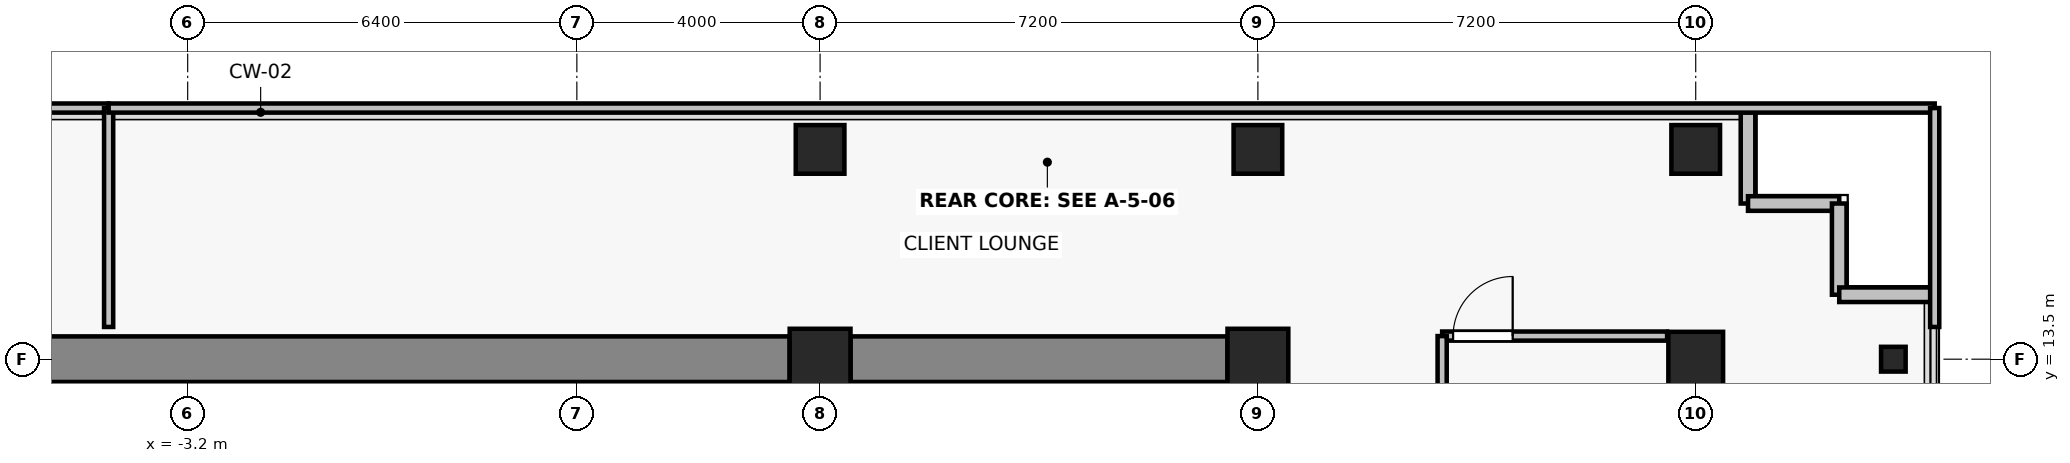
"""IFC4 building model, lengths in metres.
Left out: names, types, materials, properties, quantities, classifications, styles, units other than length and angle.
Written with IfcOpenShell. Run it as: python <this file> out.ifc"""

import sys

from ifc_helpers import new_model, si_unit, direction, frame, frame_2d, origin, origin_2d, place, context, subcontext, project, spatial, rectangle, i_section, extrude, source, transform, mapped, element, fill, save


model = new_model("IFC4")
c1 = context("Model", 3, precision=1e-05, world=origin(), true_north=direction((0.0, 1.0)))
c2 = subcontext(c1, "Body", "Model", "MODEL_VIEW")
j1 = project(units=[si_unit("LENGTHUNIT", "METRE"), si_unit("PLANEANGLEUNIT", "RADIAN")], contexts=[c1])
p1 = place(None, origin())
s1 = spatial("IfcSite", under=j1, at=p1, CompositionType="ELEMENT")
p2 = place(p1, origin())
s2 = spatial("IfcBuilding", under=s1, at=p2, CompositionType="ELEMENT")
p3 = place(p2, frame((0.0, 0.0, 109.9)))
s3 = spatial("IfcBuildingStorey", under=s2, at=p3, CompositionType="ELEMENT", Elevation=109.9)
for number, where, z_axis, x_axis in (
    (1, (7.2, 13.5, 0.0), (0.0, 0.0, 1.0), (1.0, 0.0, 0.0)),
    (2, (14.4, 13.5, 0.0), (0.0, 0.0, 1.0), (1.0, 0.0, 0.0)),
):
    element("IfcColumn", number, at=place(p3, frame(where, z_axis=z_axis, x_axis=x_axis)), inside=s3, PredefinedType="COLUMN", context=c2, shape_type="SweptSolid", body=[
        extrude(rectangle(XDim=1.0, YDim=1.0, at=origin_2d()), origin(), (0.0, 0.0, 1.0), 3.3),
    ])
p4 = place(p3, frame((21.6, 13.5, 0.0), z_axis=(0.0, 0.0, 1.0), x_axis=(1.0, 0.0, 0.0)))
e3 = element("IfcColumn", 3, at=p4, inside=s3, PredefinedType="COLUMN", context=c2, shape_type="SweptSolid", body=[
    extrude(rectangle(XDim=0.9, YDim=0.9, at=origin_2d()), origin(), (0.0, 0.0, 1.0), 3.3),
])
for number, where, z_axis, x_axis in (
    (4, (7.2, 16.95, 0.0), (0.0, 0.0, 1.0), (1.0, 0.0, 0.0)),
    (5, (14.4, 16.95, 0.0), (0.0, 0.0, 1.0), (1.0, 0.0, 0.0)),
    (6, (21.6, 16.95, 0.0), (0.0, 0.0, 1.0), (1.0, 0.0, 0.0)),
):
    element("IfcColumn", number, at=place(p3, frame(where, z_axis=z_axis, x_axis=x_axis)), inside=s3, PredefinedType="COLUMN", context=c2, shape_type="SweptSolid", body=[
        extrude(rectangle(XDim=0.8, YDim=0.8, at=origin_2d()), origin(), (0.0, 0.0, 1.0), 3.3),
    ])
p5 = place(p3, frame((24.85, 13.5, 0.0), z_axis=(0.0, 0.0, 1.0), x_axis=(1.0, 0.0, 0.0)))
e7 = element("IfcColumn", 7, at=p5, inside=s3, PredefinedType="COLUMN", context=c2, shape_type="SweptSolid", body=[
    extrude(i_section(OverallWidth=0.404, OverallDepth=0.407, WebThickness=0.022, FlangeThickness=0.032, FilletRadius=0.015, at=origin_2d()), origin(), (0.0, 0.0, 1.0), 3.3),
])
p6 = place(p3, frame((-6.7, 13.5, 0.0), z_axis=(0.0, 0.0, 1.0), x_axis=(1.0, 0.0, 0.0)))
e8 = element("IfcWall", 8, at=p6, inside=s3, PredefinedType="SHEAR", context=c2, shape_type="SweptSolid", body=[
    extrude(rectangle(XDim=13.4, YDim=0.75, at=frame_2d((6.7, 0.0))), origin(), (0.0, 0.0, 1.0), 3.075),
])
p7 = place(p3, frame((7.7, 13.5, 0.0), z_axis=(0.0, 0.0, 1.0), x_axis=(1.0, 0.0, 0.0)))
e9 = element("IfcWall", 9, at=p7, inside=s3, PredefinedType="SHEAR", context=c2, shape_type="SweptSolid", body=[
    extrude(rectangle(XDim=6.2, YDim=0.75, at=frame_2d((3.1, 0.0))), origin(), (0.0, 0.0, 1.0), 3.075),
])
for number, where, z_axis, x_axis in (
    (10, (22.46, 16.06, 0.0), (0.0, 0.0, 1.0), (0.0, 1.0, 0.0)),
    (11, (23.96, 16.06, 0.0), (0.0, 0.0, 1.0), (-1.0, 0.0, 0.0)),
    (12, (23.96, 14.56, 0.0), (0.0, 0.0, 1.0), (0.0, 1.0, 0.0)),
    (13, (25.46, 14.56, 0.0), (0.0, 0.0, 1.0), (-1.0, 0.0, 0.0)),
):
    element("IfcWall", number, at=place(p3, frame(where, z_axis=z_axis, x_axis=x_axis)), inside=s3, PredefinedType="SOLIDWALL", context=c2, shape_type="SweptSolid", body=[
        extrude(rectangle(XDim=1.5, YDim=0.24, at=frame_2d((0.75, 0.0))), origin(), (0.0, 0.0, 1.0), 3.075),
    ])
p8 = place(p3, frame((17.43, 13.88, 0.0), z_axis=(0.0, 0.0, 1.0), x_axis=(1.0, 0.0, 0.0)))
e14 = element("IfcWall", 14, at=p8, inside=s3, PredefinedType="PARTITIONING", context=c2, shape_type="SweptSolid", body=[
    extrude(rectangle(XDim=3.7, YDim=0.15, at=frame_2d((1.85, 0.0))), origin(), (0.0, 0.0, 1.0), 3.075),
])
p9 = place(p8, frame((0.18, 0.0, 0.0)))
e15 = element("IfcOpeningElement", 15, at=p9, cuts=e14, PredefinedType="OPENING", context=c2, shape_type="SweptSolid", body=[
    extrude(rectangle(XDim=0.98, YDim=2.15, at=frame_2d((0.49, 1.075))), frame((0.0, 0.085, 0.0), z_axis=(0.0, -1.0, 0.0), x_axis=(1.0, 0.0, 0.0)), (0.0, 0.0, 1.0), 0.17),
])
p10 = place(p3, frame((17.43, -1.77, 0.0), z_axis=(0.0, 0.0, 1.0), x_axis=(0.0, 1.0, 0.0)))
e16 = element("IfcWall", 16, at=p10, inside=s3, PredefinedType="PARTITIONING", context=c2, shape_type="SweptSolid", body=[
    extrude(rectangle(XDim=15.65, YDim=0.15, at=frame_2d((7.825, 0.0))), origin(), (0.0, 0.0, 1.0), 2.515),
])
p11 = place(p10, frame((7.335, 0.0, 0.0)))
e17 = element("IfcOpeningElement", 17, at=p11, cuts=e16, PredefinedType="OPENING", context=c2, shape_type="SweptSolid", body=[
    extrude(rectangle(XDim=0.98, YDim=2.15, at=frame_2d((0.49, 1.075))), frame((0.0, 0.085, 0.0), z_axis=(0.0, -1.0, 0.0), x_axis=(1.0, 0.0, 0.0)), (0.0, 0.0, 1.0), 0.17),
])
p12 = place(p3, frame((-29.53, 17.63, 0.0), z_axis=(0.0, 0.0, 1.0), x_axis=(1.0, 0.0, 0.0)))
e18 = element("IfcWall", 18, at=p12, inside=s3, PredefinedType="PARTITIONING", context=c2, shape_type="SweptSolid", body=[
    extrude(rectangle(XDim=25.03, YDim=0.15, at=frame_2d((12.515, 0.0))), origin(), (0.0, 0.0, 1.0), 2.59),
])
p13 = place(p3, frame((-4.5, 17.63, 0.0), z_axis=(0.0, 0.0, 1.0), x_axis=(0.0, -1.0, 0.0)))
e19 = element("IfcWall", 19, at=p13, inside=s3, PredefinedType="PARTITIONING", context=c2, shape_type="SweptSolid", body=[
    extrude(rectangle(XDim=3.6, YDim=0.15, at=frame_2d((1.8, 0.0))), origin(), (0.0, 0.0, 1.0), 2.565),
])
p14 = place(p3, frame((-4.5, 17.63, 0.0), z_axis=(0.0, 0.0, 1.0), x_axis=(1.0, 0.0, 0.0)))
e20 = element("IfcWall", 20, at=p14, inside=s3, PredefinedType="PARTITIONING", context=c2, shape_type="SweptSolid", body=[
    extrude(rectangle(XDim=30.03, YDim=0.15, at=frame_2d((15.015, 0.0))), origin(), (0.0, 0.0, 1.0), 2.59),
])
p15 = place(p3, frame((25.53, 17.63, 0.0), z_axis=(0.0, 0.0, 1.0), x_axis=(0.0, -1.0, 0.0)))
e21 = element("IfcWall", 21, at=p15, inside=s3, PredefinedType="PARTITIONING", context=c2, shape_type="SweptSolid", body=[
    extrude(rectangle(XDim=3.6, YDim=0.15, at=frame_2d((1.8, 0.0))), origin(), (0.0, 0.0, 1.0), 3.075),
])
m1 = source(origin(), c2, "Body", "SweptSolid", [
    extrude(rectangle(XDim=0.98, YDim=2.15, at=frame_2d((0.49, 1.075))), frame((0.0, 0.025, 0.0), z_axis=(0.0, -1.0, 0.0), x_axis=(1.0, 0.0, 0.0)), (0.0, 0.0, 1.0), 0.05),
])
p16 = place(p9, origin())
e22 = element("IfcDoor", 22, at=p16, inside=s3, OperationType="SINGLE_SWING_RIGHT", PredefinedType="DOOR", context=c2, shape_type="MappedRepresentation", body=[
    mapped(m1, transform((0.0, 0.0, 0.0), x_axis=(1.0, 0.0, 0.0), y_axis=(0.0, 1.0, 0.0), z_axis=(0.0, 0.0, 1.0), scale=1.0)),
])
fill(e15, e22)
save(model, sys.argv[1])
